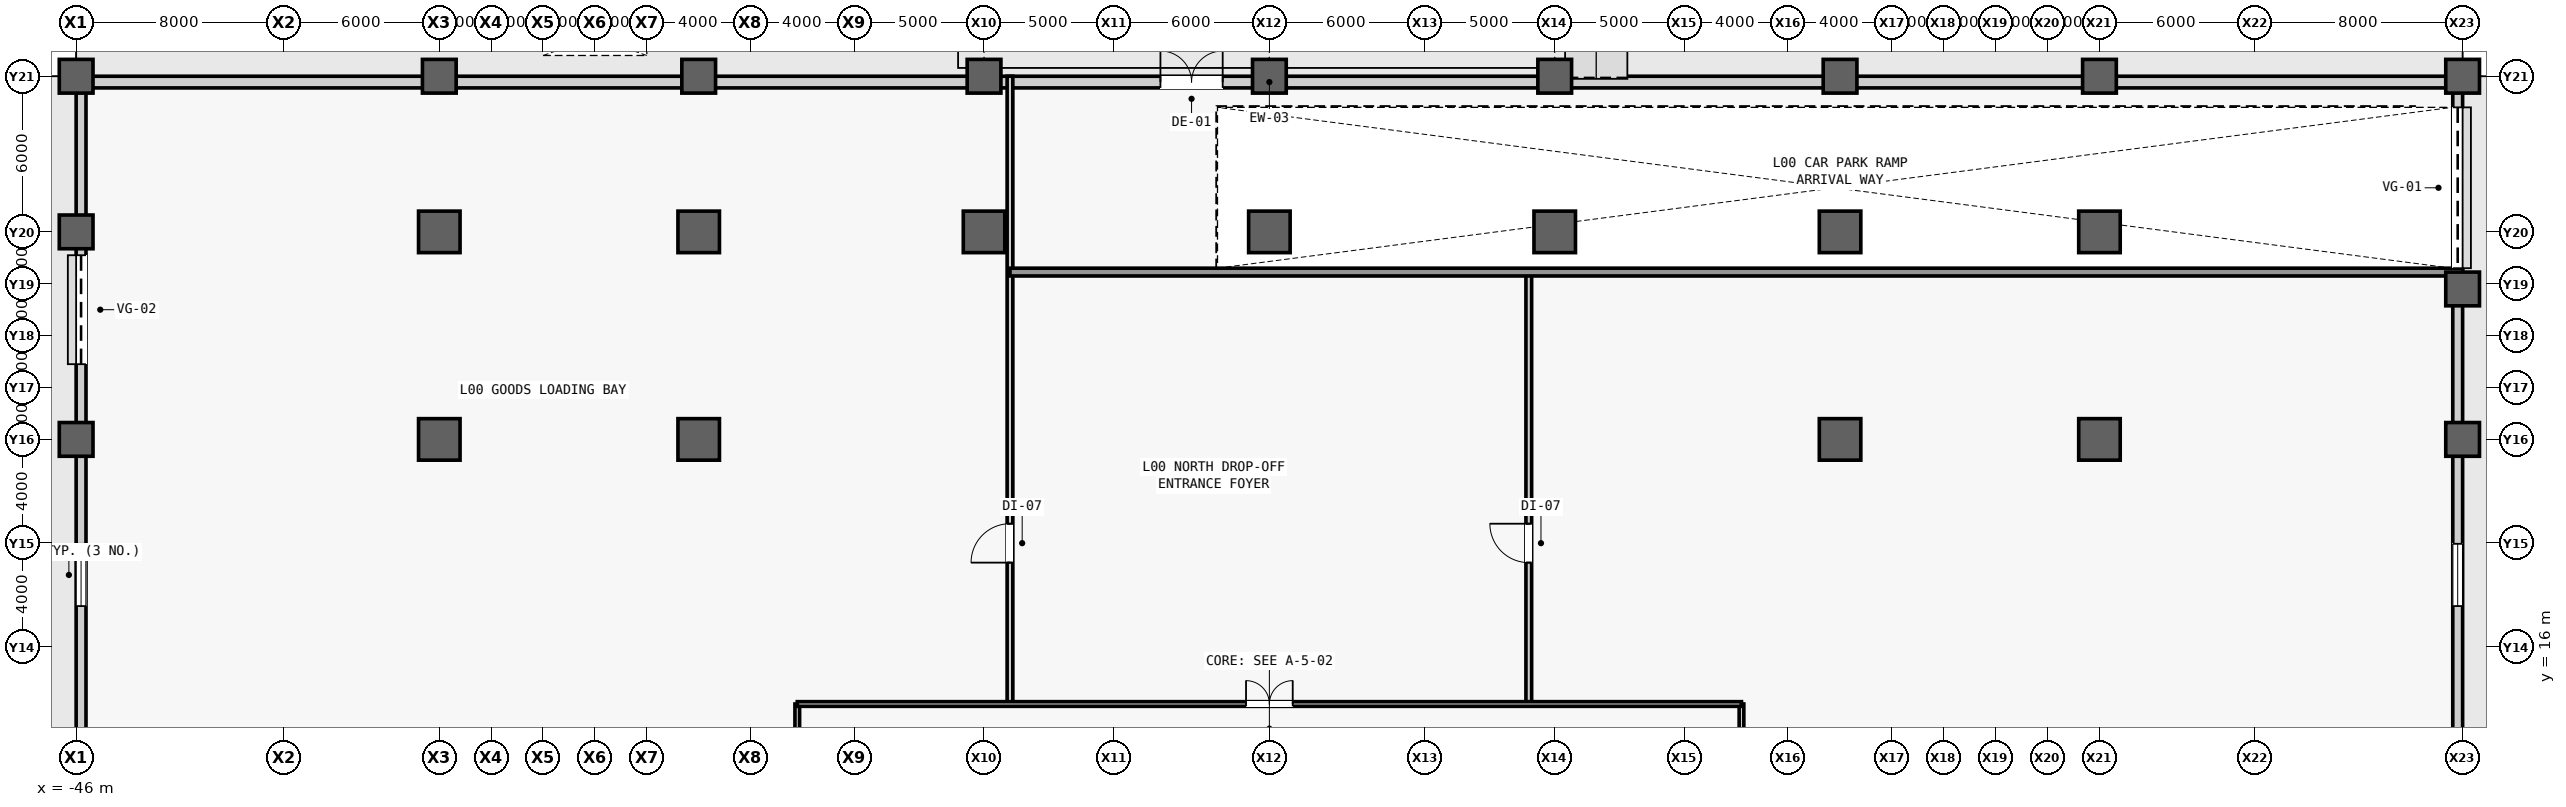
"""IFC4 building model, lengths in metres.
Left out: names, types, materials, properties, quantities, classifications, styles, units other than length and angle.
Written with IfcOpenShell. Run it as: python <this file> out.ifc"""

import sys

from ifc_helpers import new_model, si_unit, direction, frame, frame_2d, origin, origin_2d, place, context, subcontext, project, spatial, rectangle, extrude, source, transform, mapped, element, fill, save


model = new_model("IFC4")
c1 = context("Model", 3, precision=1e-05, world=origin(), true_north=direction((0.0, 1.0)))
c2 = subcontext(c1, "Body", "Model", "MODEL_VIEW")
j1 = project(units=[si_unit("LENGTHUNIT", "METRE"), si_unit("PLANEANGLEUNIT", "RADIAN")], contexts=[c1])
p1 = place(None, origin())
s1 = spatial("IfcSite", under=j1, at=p1, CompositionType="ELEMENT")
p2 = place(p1, origin())
s2 = spatial("IfcBuilding", under=s1, at=p2, CompositionType="ELEMENT")
p3 = place(p2, origin())
s3 = spatial("IfcBuildingStorey", under=s2, at=p3, CompositionType="ELEMENT", Elevation=0.0)
m1 = source(origin(), c2, "Body", "SweptSolid", [
    extrude(rectangle(XDim=1.3, YDim=1.3, at=origin_2d()), origin(), (0.0, 0.0, 1.0), 6.6),
])
for number, where, z_axis, x_axis in (
    (1, (-46.0, 24.0, 0.0), (0.0, 0.0, 1.0), (1.0, 0.0, 0.0)),
    (2, (-46.0, 38.0, 0.0), (0.0, 0.0, 1.0), (1.0, 0.0, 0.0)),
):
    element("IfcColumn", number, at=place(p3, frame(where, z_axis=z_axis, x_axis=x_axis)), inside=s3, PredefinedType="COLUMN", context=c2, shape_type="MappedRepresentation", body=[
        mapped(m1, transform((0.0, 0.0, 0.0), scale=1.0)),
    ])
m2 = source(origin(), c2, "Body", "SweptSolid", [
    extrude(rectangle(XDim=1.6, YDim=1.6, at=origin_2d()), origin(), (0.0, 0.0, 1.0), 6.6),
])
for number, where, z_axis, x_axis in (
    (3, (-32.0, 24.0, 0.0), (0.0, 0.0, 1.0), (1.0, 0.0, 0.0)),
    (4, (-32.0, 32.0, 0.0), (0.0, 0.0, 1.0), (1.0, 0.0, 0.0)),
):
    element("IfcColumn", number, at=place(p3, frame(where, z_axis=z_axis, x_axis=x_axis)), inside=s3, PredefinedType="COLUMN", context=c2, shape_type="MappedRepresentation", body=[
        mapped(m2, transform((0.0, 0.0, 0.0), scale=1.0)),
    ])
p4 = place(p3, frame((-32.0, 38.0, 0.0), z_axis=(0.0, 0.0, 1.0), x_axis=(1.0, 0.0, 0.0)))
e5 = element("IfcColumn", 5, at=p4, inside=s3, PredefinedType="COLUMN", context=c2, shape_type="MappedRepresentation", body=[
    mapped(m1, transform((0.0, 0.0, 0.0), scale=1.0)),
])
for number, where, z_axis, x_axis in (
    (6, (-22.0, 24.0, 0.0), (0.0, 0.0, 1.0), (1.0, 0.0, 0.0)),
    (7, (-22.0, 32.0, 0.0), (0.0, 0.0, 1.0), (1.0, 0.0, 0.0)),
):
    element("IfcColumn", number, at=place(p3, frame(where, z_axis=z_axis, x_axis=x_axis)), inside=s3, PredefinedType="COLUMN", context=c2, shape_type="MappedRepresentation", body=[
        mapped(m2, transform((0.0, 0.0, 0.0), scale=1.0)),
    ])
p5 = place(p3, frame((-22.0, 38.0, 0.0), z_axis=(0.0, 0.0, 1.0), x_axis=(1.0, 0.0, 0.0)))
e8 = element("IfcColumn", 8, at=p5, inside=s3, PredefinedType="COLUMN", context=c2, shape_type="MappedRepresentation", body=[
    mapped(m1, transform((0.0, 0.0, 0.0), scale=1.0)),
])
p6 = place(p3, frame((-11.0, 32.0, 0.0), z_axis=(0.0, 0.0, 1.0), x_axis=(1.0, 0.0, 0.0)))
e9 = element("IfcColumn", 9, at=p6, inside=s3, PredefinedType="COLUMN", context=c2, shape_type="MappedRepresentation", body=[
    mapped(m2, transform((0.0, 0.0, 0.0), scale=1.0)),
])
p7 = place(p3, frame((-11.0, 38.0, 0.0), z_axis=(0.0, 0.0, 1.0), x_axis=(1.0, 0.0, 0.0)))
e10 = element("IfcColumn", 10, at=p7, inside=s3, PredefinedType="COLUMN", context=c2, shape_type="MappedRepresentation", body=[
    mapped(m1, transform((0.0, 0.0, 0.0), scale=1.0)),
])
p8 = place(p3, frame((0.0, 32.0, 0.0), z_axis=(0.0, 0.0, 1.0), x_axis=(1.0, 0.0, 0.0)))
e11 = element("IfcColumn", 11, at=p8, inside=s3, PredefinedType="COLUMN", context=c2, shape_type="MappedRepresentation", body=[
    mapped(m2, transform((0.0, 0.0, 0.0), scale=1.0)),
])
p9 = place(p3, frame((0.0, 38.0, 0.0), z_axis=(0.0, 0.0, 1.0), x_axis=(1.0, 0.0, 0.0)))
e12 = element("IfcColumn", 12, at=p9, inside=s3, PredefinedType="COLUMN", context=c2, shape_type="MappedRepresentation", body=[
    mapped(m1, transform((0.0, 0.0, 0.0), scale=1.0)),
])
p10 = place(p3, frame((11.0, 32.0, 0.0), z_axis=(0.0, 0.0, 1.0), x_axis=(1.0, 0.0, 0.0)))
e13 = element("IfcColumn", 13, at=p10, inside=s3, PredefinedType="COLUMN", context=c2, shape_type="MappedRepresentation", body=[
    mapped(m2, transform((0.0, 0.0, 0.0), scale=1.0)),
])
p11 = place(p3, frame((11.0, 38.0, 0.0), z_axis=(0.0, 0.0, 1.0), x_axis=(1.0, 0.0, 0.0)))
e14 = element("IfcColumn", 14, at=p11, inside=s3, PredefinedType="COLUMN", context=c2, shape_type="MappedRepresentation", body=[
    mapped(m1, transform((0.0, 0.0, 0.0), scale=1.0)),
])
for number, where, z_axis, x_axis in (
    (15, (22.0, 24.0, 0.0), (0.0, 0.0, 1.0), (1.0, 0.0, 0.0)),
    (16, (22.0, 32.0, 0.0), (0.0, 0.0, 1.0), (1.0, 0.0, 0.0)),
):
    element("IfcColumn", number, at=place(p3, frame(where, z_axis=z_axis, x_axis=x_axis)), inside=s3, PredefinedType="COLUMN", context=c2, shape_type="MappedRepresentation", body=[
        mapped(m2, transform((0.0, 0.0, 0.0), scale=1.0)),
    ])
p12 = place(p3, frame((22.0, 38.0, 0.0), z_axis=(0.0, 0.0, 1.0), x_axis=(1.0, 0.0, 0.0)))
e17 = element("IfcColumn", 17, at=p12, inside=s3, PredefinedType="COLUMN", context=c2, shape_type="MappedRepresentation", body=[
    mapped(m1, transform((0.0, 0.0, 0.0), scale=1.0)),
])
for number, where, z_axis, x_axis in (
    (18, (32.0, 24.0, 0.0), (0.0, 0.0, 1.0), (1.0, 0.0, 0.0)),
    (19, (32.0, 32.0, 0.0), (0.0, 0.0, 1.0), (1.0, 0.0, 0.0)),
):
    element("IfcColumn", number, at=place(p3, frame(where, z_axis=z_axis, x_axis=x_axis)), inside=s3, PredefinedType="COLUMN", context=c2, shape_type="MappedRepresentation", body=[
        mapped(m2, transform((0.0, 0.0, 0.0), scale=1.0)),
    ])
for number, where, z_axis, x_axis in (
    (20, (32.0, 38.0, 0.0), (0.0, 0.0, 1.0), (1.0, 0.0, 0.0)),
    (21, (46.0, 24.0, 0.0), (0.0, 0.0, 1.0), (1.0, 0.0, 0.0)),
    (22, (46.0, 38.0, 0.0), (0.0, 0.0, 1.0), (1.0, 0.0, 0.0)),
    (23, (-46.0, 32.0, 0.0), (0.0, 0.0, 1.0), (1.0, 0.0, 0.0)),
    (24, (46.0, 29.8, 0.0), (0.0, 0.0, 1.0), (1.0, 0.0, 0.0)),
):
    element("IfcColumn", number, at=place(p3, frame(where, z_axis=z_axis, x_axis=x_axis)), inside=s3, PredefinedType="COLUMN", context=c2, shape_type="MappedRepresentation", body=[
        mapped(m1, transform((0.0, 0.0, 0.0), scale=1.0)),
    ])
m3 = source(origin(), c2, "Body", "SweptSolid", [
    extrude(rectangle(XDim=92.0, YDim=0.45, at=frame_2d((46.0, 0.0))), origin(), (0.0, 0.0, 1.0), 4.48),
])
p13 = place(p3, frame((-46.0, 37.775, 0.0), z_axis=(0.0, 0.0, 1.0), x_axis=(1.0, 0.0, 0.0)))
e25 = element("IfcWall", 25, at=p13, inside=s3, PredefinedType="STANDARD", context=c2, shape_type="MappedRepresentation", body=[
    mapped(m3, transform((0.0, 0.0, 0.0), scale=1.0)),
])
m4 = source(origin(), c2, "Body", "SweptSolid", [
    extrude(rectangle(XDim=2.4, YDim=2.8, at=frame_2d((1.2, 1.4))), frame((0.0, 0.235, 0.0), z_axis=(0.0, -1.0, 0.0), x_axis=(1.0, 0.0, 0.0)), (0.0, 0.0, 1.0), 0.47),
])
p14 = place(p13, frame((41.8, 0.0, 0.0)))
e26 = element("IfcOpeningElement", 26, at=p14, cuts=e25, PredefinedType="OPENING", context=c2, shape_type="MappedRepresentation", body=[
    mapped(m4, transform((0.0, 0.0, 0.0), scale=1.0)),
])
m5 = source(origin(), c2, "Body", "SweptSolid", [
    extrude(rectangle(XDim=75.1, YDim=0.38, at=frame_2d((37.55, 0.0))), origin(), (0.0, 0.0, 1.0), 4.48),
])
p15 = place(p3, frame((-45.81, -37.55, 0.0), z_axis=(0.0, 0.0, 1.0), x_axis=(0.0, 1.0, 0.0)))
e27 = element("IfcWall", 27, at=p15, inside=s3, PredefinedType="STANDARD", context=c2, shape_type="MappedRepresentation", body=[
    mapped(m5, transform((0.0, 0.0, 0.0), scale=1.0)),
])
m6 = source(origin(), c2, "Body", "SweptSolid", [
    extrude(rectangle(XDim=2.0, YDim=2.3, at=frame_2d((1.0, 1.15))), frame((0.0, 0.2, 0.0), z_axis=(0.0, -1.0, 0.0), x_axis=(1.0, 0.0, 0.0)), (0.0, 0.0, 1.0), 0.4),
])
p16 = place(p15, frame((9.55, 0.0, 0.0)))
e28 = element("IfcOpeningElement", 28, at=p16, cuts=e27, PredefinedType="OPENING", context=c2, shape_type="MappedRepresentation", body=[
    mapped(m6, transform((0.0, 0.0, 0.0), scale=1.0)),
])
m7 = source(origin(), c2, "Body", "SweptSolid", [
    extrude(rectangle(XDim=1.05, YDim=2.25, at=frame_2d((0.525, 1.125))), frame((0.0, 0.2, 0.0), z_axis=(0.0, -1.0, 0.0), x_axis=(1.0, 0.0, 0.0)), (0.0, 0.0, 1.0), 0.4),
])
p17 = place(p15, frame((16.35, 0.0, 0.0)))
e29 = element("IfcOpeningElement", 29, at=p17, cuts=e27, PredefinedType="OPENING", context=c2, shape_type="MappedRepresentation", body=[
    mapped(m7, transform((0.0, 0.0, 0.0), scale=1.0)),
])
m8 = source(origin(), c2, "Body", "SweptSolid", [
    extrude(rectangle(XDim=4.2, YDim=4.2, at=frame_2d((2.1, 2.1))), frame((0.0, 0.2, 0.0), z_axis=(0.0, -1.0, 0.0), x_axis=(1.0, 0.0, 0.0)), (0.0, 0.0, 1.0), 0.4),
])
p18 = place(p15, frame((64.45, 0.0, 0.0)))
e30 = element("IfcOpeningElement", 30, at=p18, cuts=e27, PredefinedType="OPENING", context=c2, shape_type="MappedRepresentation", body=[
    mapped(m8, transform((0.0, 0.0, 0.0), scale=1.0)),
])
m9 = source(origin(), c2, "Body", "SweptSolid", [
    extrude(rectangle(XDim=2.4, YDim=2.6, at=frame_2d((1.2, 1.3))), frame((0.0, 0.2, 0.0), z_axis=(0.0, -1.0, 0.0), x_axis=(1.0, 0.0, 0.0)), (0.0, 0.0, 1.0), 0.4),
])
p19 = place(p15, frame((55.125, 0.0, 0.7)))
e31 = element("IfcOpeningElement", 31, at=p19, cuts=e27, PredefinedType="OPENING", context=c2, shape_type="MappedRepresentation", body=[
    mapped(m9, transform((0.0, 0.0, 0.0), scale=1.0)),
])
p20 = place(p3, frame((45.81, 37.55, 0.0), z_axis=(0.0, 0.0, 1.0), x_axis=(0.0, -1.0, 0.0)))
e32 = element("IfcWall", 32, at=p20, inside=s3, PredefinedType="STANDARD", context=c2, shape_type="MappedRepresentation", body=[
    mapped(m5, transform((0.0, 0.0, 0.0), scale=1.0)),
])
p21 = place(p20, frame((63.55, 0.0, 0.0)))
e33 = element("IfcOpeningElement", 33, at=p21, cuts=e32, PredefinedType="OPENING", context=c2, shape_type="MappedRepresentation", body=[
    mapped(m6, transform((0.0, 0.0, 0.0), scale=1.0)),
])
m10 = source(origin(), c2, "Body", "SweptSolid", [
    extrude(rectangle(XDim=6.2, YDim=3.6, at=frame_2d((3.1, 1.8))), frame((0.0, 0.2, 0.0), z_axis=(0.0, -1.0, 0.0), x_axis=(1.0, 0.0, 0.0)), (0.0, 0.0, 1.0), 0.4),
])
p22 = place(p20, frame((0.75, 0.0, 0.0)))
e34 = element("IfcOpeningElement", 34, at=p22, cuts=e32, PredefinedType="OPENING", context=c2, shape_type="MappedRepresentation", body=[
    mapped(m10, transform((0.0, 0.0, 0.0), scale=1.0)),
])
p23 = place(p20, frame((17.575, 0.0, 0.7)))
e35 = element("IfcOpeningElement", 35, at=p23, cuts=e32, PredefinedType="OPENING", context=c2, shape_type="MappedRepresentation", body=[
    mapped(m9, transform((0.0, 0.0, 0.0), scale=1.0)),
])
p24 = place(p20, frame((55.125, 0.0, 0.7)))
e36 = element("IfcOpeningElement", 36, at=p24, cuts=e32, PredefinedType="OPENING", context=c2, shape_type="MappedRepresentation", body=[
    mapped(m9, transform((0.0, 0.0, 0.0), scale=1.0)),
])
m11 = source(origin(), c2, "Body", "SweptSolid", [
    extrude(rectangle(XDim=27.0, YDim=0.18, at=frame_2d((13.5, 0.0))), origin(), (0.0, 0.0, 1.0), 6.28),
])
p25 = place(p3, frame((-18.2, -13.2, 0.0), z_axis=(0.0, 0.0, 1.0), x_axis=(0.0, 1.0, 0.0)))
e37 = element("IfcWall", 37, at=p25, inside=s3, PredefinedType="PARTITIONING", context=c2, shape_type="MappedRepresentation", body=[
    mapped(m11, transform((0.0, 0.0, 0.0), scale=1.0)),
])
m12 = source(origin(), c2, "Body", "SweptSolid", [
    extrude(rectangle(XDim=0.9, YDim=2.15, at=frame_2d((0.45, 1.075))), frame((0.0, 0.1, 0.0), z_axis=(0.0, -1.0, 0.0), x_axis=(1.0, 0.0, 0.0)), (0.0, 0.0, 1.0), 0.2),
])
p26 = place(p25, frame((6.55, 0.0, 0.0)))
e38 = element("IfcOpeningElement", 38, at=p26, cuts=e37, PredefinedType="OPENING", context=c2, shape_type="MappedRepresentation", body=[
    mapped(m12, transform((0.0, 0.0, 0.0), scale=1.0)),
])
m13 = source(origin(), c2, "Body", "SweptSolid", [
    extrude(rectangle(XDim=1.05, YDim=2.2, at=frame_2d((0.525, 1.1))), frame((0.0, 0.1, 0.0), z_axis=(0.0, -1.0, 0.0), x_axis=(1.0, 0.0, 0.0)), (0.0, 0.0, 1.0), 0.2),
])
p27 = place(p25, frame((17.675, 0.0, 0.0)))
e39 = element("IfcOpeningElement", 39, at=p27, cuts=e37, PredefinedType="OPENING", context=c2, shape_type="MappedRepresentation", body=[
    mapped(m13, transform((0.0, 0.0, 0.0), scale=1.0)),
])
p28 = place(p3, frame((18.2, -13.2, 0.0), z_axis=(0.0, 0.0, 1.0), x_axis=(0.0, 1.0, 0.0)))
e40 = element("IfcWall", 40, at=p28, inside=s3, PredefinedType="PARTITIONING", context=c2, shape_type="MappedRepresentation", body=[
    mapped(m11, transform((0.0, 0.0, 0.0), scale=1.0)),
])
m14 = source(origin(), c2, "Body", "SweptSolid", [
    extrude(rectangle(XDim=1.8, YDim=2.25, at=frame_2d((0.9, 1.125))), frame((0.0, 0.1, 0.0), z_axis=(0.0, -1.0, 0.0), x_axis=(1.0, 0.0, 0.0)), (0.0, 0.0, 1.0), 0.2),
])
p29 = place(p28, frame((18.8, 0.0, 0.0)))
e41 = element("IfcOpeningElement", 41, at=p29, cuts=e40, PredefinedType="OPENING", context=c2, shape_type="MappedRepresentation", body=[
    mapped(m14, transform((0.0, 0.0, 0.0), scale=1.0)),
])
m15 = source(origin(), c2, "Body", "SweptSolid", [
    extrude(rectangle(XDim=24.2, YDim=0.22, at=frame_2d((12.1, 0.0))), origin(), (0.0, 0.0, 1.0), 6.28),
])
p30 = place(p3, frame((-10.0, 13.8, 0.0), z_axis=(0.0, 0.0, 1.0), x_axis=(0.0, 1.0, 0.0)))
e42 = element("IfcWall", 42, at=p30, inside=s3, PredefinedType="PARTITIONING", context=c2, shape_type="MappedRepresentation", body=[
    mapped(m15, transform((0.0, 0.0, 0.0), scale=1.0)),
])
m16 = source(origin(), c2, "Body", "SweptSolid", [
    extrude(rectangle(XDim=1.5, YDim=2.3, at=frame_2d((0.75, 1.15))), frame((0.0, 0.12, 0.0), z_axis=(0.0, -1.0, 0.0), x_axis=(1.0, 0.0, 0.0)), (0.0, 0.0, 1.0), 0.24),
])
p31 = place(p30, frame((5.45, 0.0, 0.0)))
e43 = element("IfcOpeningElement", 43, at=p31, cuts=e42, PredefinedType="OPENING", context=c2, shape_type="MappedRepresentation", body=[
    mapped(m16, transform((0.0, 0.0, 0.0), scale=1.0)),
])
m17 = source(origin(), c2, "Body", "SweptSolid", [
    extrude(rectangle(XDim=16.6, YDim=0.22, at=frame_2d((8.3, 0.0))), origin(), (0.0, 0.0, 1.0), 6.28),
])
p32 = place(p3, frame((10.0, 13.8, 0.0), z_axis=(0.0, 0.0, 1.0), x_axis=(0.0, 1.0, 0.0)))
e44 = element("IfcWall", 44, at=p32, inside=s3, PredefinedType="PARTITIONING", context=c2, shape_type="MappedRepresentation", body=[
    mapped(m17, transform((0.0, 0.0, 0.0), scale=1.0)),
])
p33 = place(p32, frame((5.45, 0.0, 0.0)))
e45 = element("IfcOpeningElement", 45, at=p33, cuts=e44, PredefinedType="OPENING", context=c2, shape_type="MappedRepresentation", body=[
    mapped(m16, transform((0.0, 0.0, 0.0), scale=1.0)),
])
m18 = source(origin(), c2, "Body", "SweptSolid", [
    extrude(rectangle(XDim=56.0, YDim=0.3, at=frame_2d((28.0, 0.0))), origin(), (0.0, 0.0, 1.0), 6.28),
])
p34 = place(p3, frame((-10.0, 30.45, 0.0), z_axis=(0.0, 0.0, 1.0), x_axis=(1.0, 0.0, 0.0)))
e46 = element("IfcWall", 46, at=p34, inside=s3, PredefinedType="SHEAR", context=c2, shape_type="MappedRepresentation", body=[
    mapped(m18, transform((0.0, 0.0, 0.0), scale=1.0)),
])
m19 = source(origin(), c2, "Body", "SweptSolid", [
    extrude(rectangle(XDim=36.4, YDim=0.18, at=frame_2d((18.2, 0.0))), origin(), (0.0, 0.0, 1.0), 6.28),
])
p35 = place(p3, frame((-18.2, 13.8, 0.0), z_axis=(0.0, 0.0, 1.0), x_axis=(1.0, 0.0, 0.0)))
e47 = element("IfcWall", 47, at=p35, inside=s3, PredefinedType="PARTITIONING", context=c2, shape_type="MappedRepresentation", body=[
    mapped(m19, transform((0.0, 0.0, 0.0), scale=1.0)),
])
p36 = place(p35, frame((17.3, 0.0, 0.0)))
e48 = element("IfcOpeningElement", 48, at=p36, cuts=e47, PredefinedType="OPENING", context=c2, shape_type="MappedRepresentation", body=[
    mapped(m14, transform((0.0, 0.0, 0.0), scale=1.0)),
])
m20 = source(origin(), c2, "Body", "SweptSolid", [
    extrude(rectangle(XDim=2.4, YDim=2.8, at=frame_2d((1.2, 1.4))), frame((0.0, 0.025, 0.0), z_axis=(0.0, -1.0, 0.0), x_axis=(1.0, 0.0, 0.0)), (0.0, 0.0, 1.0), 0.05),
])
p37 = place(p14, origin())
e49 = element("IfcDoor", 49, at=p37, inside=s3, OperationType="DOUBLE_DOOR_SINGLE_SWING", PredefinedType="DOOR", context=c2, shape_type="MappedRepresentation", body=[
    mapped(m20, transform((0.0, 0.0, 0.0), scale=1.0)),
])
fill(e26, e49)
m21 = source(origin(), c2, "Body", "SweptSolid", [
    extrude(rectangle(XDim=4.2, YDim=4.2, at=frame_2d((2.1, 2.1))), frame((0.0, 0.025, 0.0), z_axis=(0.0, -1.0, 0.0), x_axis=(1.0, 0.0, 0.0)), (0.0, 0.0, 1.0), 0.05),
])
p38 = place(p18, origin())
e50 = element("IfcDoor", 50, at=p38, inside=s3, OperationType="ROLLINGUP", PredefinedType="GATE", context=c2, shape_type="MappedRepresentation", body=[
    mapped(m21, transform((0.0, 0.0, 0.0), scale=1.0)),
])
fill(e30, e50)
m22 = source(origin(), c2, "Body", "SweptSolid", [
    extrude(rectangle(XDim=2.4, YDim=2.6, at=frame_2d((1.2, 1.3))), frame((0.0, 0.03, 0.0), z_axis=(0.0, -1.0, 0.0), x_axis=(1.0, 0.0, 0.0)), (0.0, 0.0, 1.0), 0.06),
])
p39 = place(p19, origin())
e51 = element("IfcWindow", 51, at=p39, inside=s3, PartitioningType="SINGLE_PANEL", PredefinedType="WINDOW", context=c2, shape_type="MappedRepresentation", body=[
    mapped(m22, transform((0.0, 0.0, 0.0), scale=1.0)),
])
fill(e31, e51)
m23 = source(origin(), c2, "Body", "SweptSolid", [
    extrude(rectangle(XDim=6.2, YDim=3.6, at=frame_2d((3.1, 1.8))), frame((0.0, 0.025, 0.0), z_axis=(0.0, -1.0, 0.0), x_axis=(1.0, 0.0, 0.0)), (0.0, 0.0, 1.0), 0.05),
])
p40 = place(p22, origin())
e52 = element("IfcDoor", 52, at=p40, inside=s3, OperationType="ROLLINGUP", PredefinedType="GATE", context=c2, shape_type="MappedRepresentation", body=[
    mapped(m23, transform((0.0, 0.0, 0.0), scale=1.0)),
])
fill(e34, e52)
p41 = place(p23, origin())
e53 = element("IfcWindow", 53, at=p41, inside=s3, PartitioningType="SINGLE_PANEL", PredefinedType="WINDOW", context=c2, shape_type="MappedRepresentation", body=[
    mapped(m22, transform((0.0, 0.0, 0.0), scale=1.0)),
])
fill(e35, e53)
m24 = source(origin(), c2, "Body", "SweptSolid", [
    extrude(rectangle(XDim=1.5, YDim=2.3, at=frame_2d((0.75, 1.15))), frame((0.0, 0.025, 0.0), z_axis=(0.0, -1.0, 0.0), x_axis=(1.0, 0.0, 0.0)), (0.0, 0.0, 1.0), 0.05),
])
p42 = place(p31, origin())
e54 = element("IfcDoor", 54, at=p42, inside=s3, OperationType="SINGLE_SWING_LEFT", PredefinedType="DOOR", context=c2, shape_type="MappedRepresentation", body=[
    mapped(m24, transform((0.0, 0.0, 0.0), scale=1.0)),
])
fill(e43, e54)
p43 = place(p33, origin())
e55 = element("IfcDoor", 55, at=p43, inside=s3, OperationType="SINGLE_SWING_RIGHT", PredefinedType="DOOR", context=c2, shape_type="MappedRepresentation", body=[
    mapped(m24, transform((0.0, 0.0, 0.0), scale=1.0)),
])
fill(e45, e55)
m25 = source(origin(), c2, "Body", "SweptSolid", [
    extrude(rectangle(XDim=1.8, YDim=2.25, at=frame_2d((0.9, 1.125))), frame((0.0, 0.025, 0.0), z_axis=(0.0, -1.0, 0.0), x_axis=(1.0, 0.0, 0.0)), (0.0, 0.0, 1.0), 0.05),
])
p44 = place(p36, origin())
e56 = element("IfcDoor", 56, at=p44, inside=s3, OperationType="SINGLE_SWING_LEFT", PredefinedType="DOOR", context=c2, shape_type="MappedRepresentation", body=[
    mapped(m25, transform((0.0, 0.0, 0.0), scale=1.0)),
])
fill(e48, e56)
save(model, sys.argv[1])
